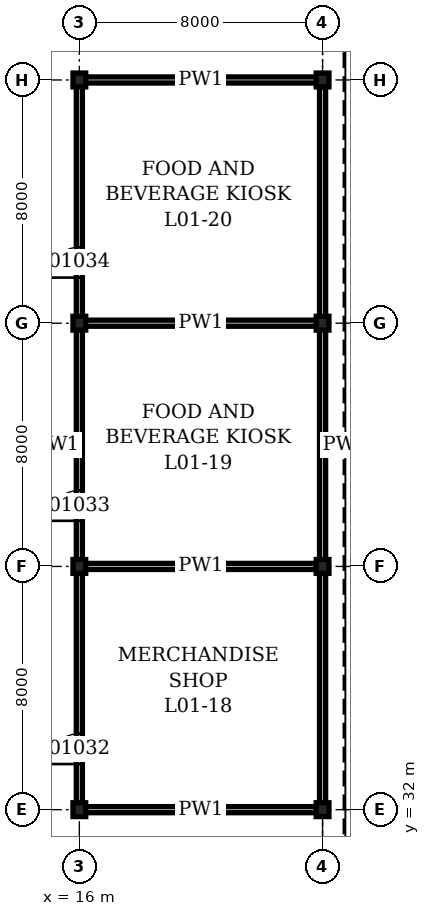
"""IFC4 building model, lengths in metres.
Left out: names, types, materials, properties, quantities, classifications, styles, units other than length and angle.
Written with IfcOpenShell. Run it as: python <this file> out.ifc"""

import sys

from ifc_helpers import new_model, si_unit, direction, frame, frame_2d, origin, origin_2d, place, context, subcontext, project, spatial, rectangle, i_section, extrude, element, fill, save


model = new_model("IFC4")
c1 = context("Model", 3, precision=1e-05, world=origin(), true_north=direction((0.0, 1.0)))
c2 = subcontext(c1, "Body", "Model", "MODEL_VIEW")
j1 = project(units=[si_unit("LENGTHUNIT", "METRE"), si_unit("PLANEANGLEUNIT", "RADIAN")], contexts=[c1])
p1 = place(None, origin())
s1 = spatial("IfcSite", under=j1, at=p1, CompositionType="ELEMENT")
p2 = place(p1, origin())
s2 = spatial("IfcBuilding", under=s1, at=p2, CompositionType="ELEMENT")
p3 = place(p2, frame((0.0, 0.0, 4.9)))
s3 = spatial("IfcBuildingStorey", under=s2, at=p3, CompositionType="ELEMENT", Elevation=4.9)
for number, where, z_axis, x_axis in (
    (1, (16.0, 32.0, 0.0), (0.0, 0.0, 1.0), (1.0, 0.0, 0.0)),
    (2, (16.0, 40.0, 0.0), (0.0, 0.0, 1.0), (1.0, 0.0, 0.0)),
    (3, (16.0, 48.0, 0.0), (0.0, 0.0, 1.0), (1.0, 0.0, 0.0)),
    (4, (16.0, 56.0, 0.0), (0.0, 0.0, 1.0), (1.0, 0.0, 0.0)),
    (5, (24.0, 32.0, 0.0), (0.0, 0.0, 1.0), (1.0, 0.0, 0.0)),
    (6, (24.0, 40.0, 0.0), (0.0, 0.0, 1.0), (1.0, 0.0, 0.0)),
    (7, (24.0, 48.0, 0.0), (0.0, 0.0, 1.0), (1.0, 0.0, 0.0)),
    (8, (24.0, 56.0, 0.0), (0.0, 0.0, 1.0), (1.0, 0.0, 0.0)),
):
    element("IfcColumn", number, at=place(p3, frame(where, z_axis=z_axis, x_axis=x_axis)), inside=s3, PredefinedType="COLUMN", context=c2, shape_type="SweptSolid", body=[
        extrude(i_section(OverallWidth=0.419, OverallDepth=0.455, WebThickness=0.042, FlangeThickness=0.068, at=origin_2d()), origin(), (0.0, 0.0, 1.0), 5.0),
    ])
for number, where, z_axis, x_axis in (
    (9, (16.1, 32.0, 0.0), (0.0, 0.0, 1.0), (1.0, 0.0, 0.0)),
    (10, (16.1, 40.0, 0.0), (0.0, 0.0, 1.0), (1.0, 0.0, 0.0)),
    (11, (16.1, 48.0, 0.0), (0.0, 0.0, 1.0), (1.0, 0.0, 0.0)),
    (12, (16.1, 56.0, 0.0), (0.0, 0.0, 1.0), (1.0, 0.0, 0.0)),
):
    element("IfcWall", number, at=place(p3, frame(where, z_axis=z_axis, x_axis=x_axis)), inside=s3, PredefinedType="PARTITIONING", context=c2, shape_type="SweptSolid", body=[
        extrude(rectangle(XDim=7.8, YDim=0.2, at=frame_2d((3.9, 0.0))), origin(), (0.0, 0.0, 1.0), 4.028),
    ])
p4 = place(p3, frame((16.0, 32.1, 0.0), z_axis=(0.0, 0.0, 1.0), x_axis=(0.0, 1.0, 0.0)))
e13 = element("IfcWall", 13, at=p4, inside=s3, PredefinedType="PARTITIONING", context=c2, shape_type="SweptSolid", body=[
    extrude(rectangle(XDim=23.8, YDim=0.2, at=frame_2d((11.9, 0.0))), origin(), (0.0, 0.0, 1.0), 4.028),
])
p5 = place(p4, frame((1.4, 0.0, 0.0)))
e14 = element("IfcOpeningElement", 14, at=p5, cuts=e13, PredefinedType="OPENING", context=c2, shape_type="SweptSolid", body=[
    extrude(rectangle(XDim=1.0, YDim=2.1, at=frame_2d((0.5, 1.05))), frame((0.0, 0.11, 0.0), z_axis=(0.0, -1.0, 0.0), x_axis=(1.0, 0.0, 0.0)), (0.0, 0.0, 1.0), 0.22),
])
p6 = place(p4, frame((9.4, 0.0, 0.0)))
e15 = element("IfcOpeningElement", 15, at=p6, cuts=e13, PredefinedType="OPENING", context=c2, shape_type="SweptSolid", body=[
    extrude(rectangle(XDim=1.0, YDim=2.1, at=frame_2d((0.5, 1.05))), frame((0.0, 0.11, 0.0), z_axis=(0.0, -1.0, 0.0), x_axis=(1.0, 0.0, 0.0)), (0.0, 0.0, 1.0), 0.22),
])
p7 = place(p4, frame((17.4, 0.0, 0.0)))
e16 = element("IfcOpeningElement", 16, at=p7, cuts=e13, PredefinedType="OPENING", context=c2, shape_type="SweptSolid", body=[
    extrude(rectangle(XDim=1.0, YDim=2.1, at=frame_2d((0.5, 1.05))), frame((0.0, 0.11, 0.0), z_axis=(0.0, -1.0, 0.0), x_axis=(1.0, 0.0, 0.0)), (0.0, 0.0, 1.0), 0.22),
])
p8 = place(p3, frame((24.0, 32.1, 0.0), z_axis=(0.0, 0.0, 1.0), x_axis=(0.0, 1.0, 0.0)))
e17 = element("IfcWall", 17, at=p8, inside=s3, PredefinedType="PARTITIONING", context=c2, shape_type="SweptSolid", body=[
    extrude(rectangle(XDim=23.8, YDim=0.2, at=frame_2d((11.9, 0.0))), origin(), (0.0, 0.0, 1.0), 4.028),
])
p9 = place(p5, origin())
e18 = element("IfcDoor", 18, at=p9, inside=s3, OperationType="SINGLE_SWING_LEFT", PredefinedType="DOOR", context=c2, shape_type="SweptSolid", body=[
    extrude(rectangle(XDim=1.0, YDim=2.1, at=frame_2d((0.5, 1.05))), frame((0.0, 0.1, 0.0), z_axis=(0.0, -1.0, 0.0), x_axis=(1.0, 0.0, 0.0)), (0.0, 0.0, 1.0), 0.199),
])
fill(e14, e18)
p10 = place(p6, origin())
e19 = element("IfcDoor", 19, at=p10, inside=s3, OperationType="SINGLE_SWING_LEFT", PredefinedType="DOOR", context=c2, shape_type="SweptSolid", body=[
    extrude(rectangle(XDim=1.0, YDim=2.1, at=frame_2d((0.5, 1.05))), frame((0.0, 0.1, 0.0), z_axis=(0.0, -1.0, 0.0), x_axis=(1.0, 0.0, 0.0)), (0.0, 0.0, 1.0), 0.199),
])
fill(e15, e19)
p11 = place(p7, origin())
e20 = element("IfcDoor", 20, at=p11, inside=s3, OperationType="SINGLE_SWING_LEFT", PredefinedType="DOOR", context=c2, shape_type="SweptSolid", body=[
    extrude(rectangle(XDim=1.0, YDim=2.1, at=frame_2d((0.5, 1.05))), frame((0.0, 0.1, 0.0), z_axis=(0.0, -1.0, 0.0), x_axis=(1.0, 0.0, 0.0)), (0.0, 0.0, 1.0), 0.199),
])
fill(e16, e20)
save(model, sys.argv[1])
